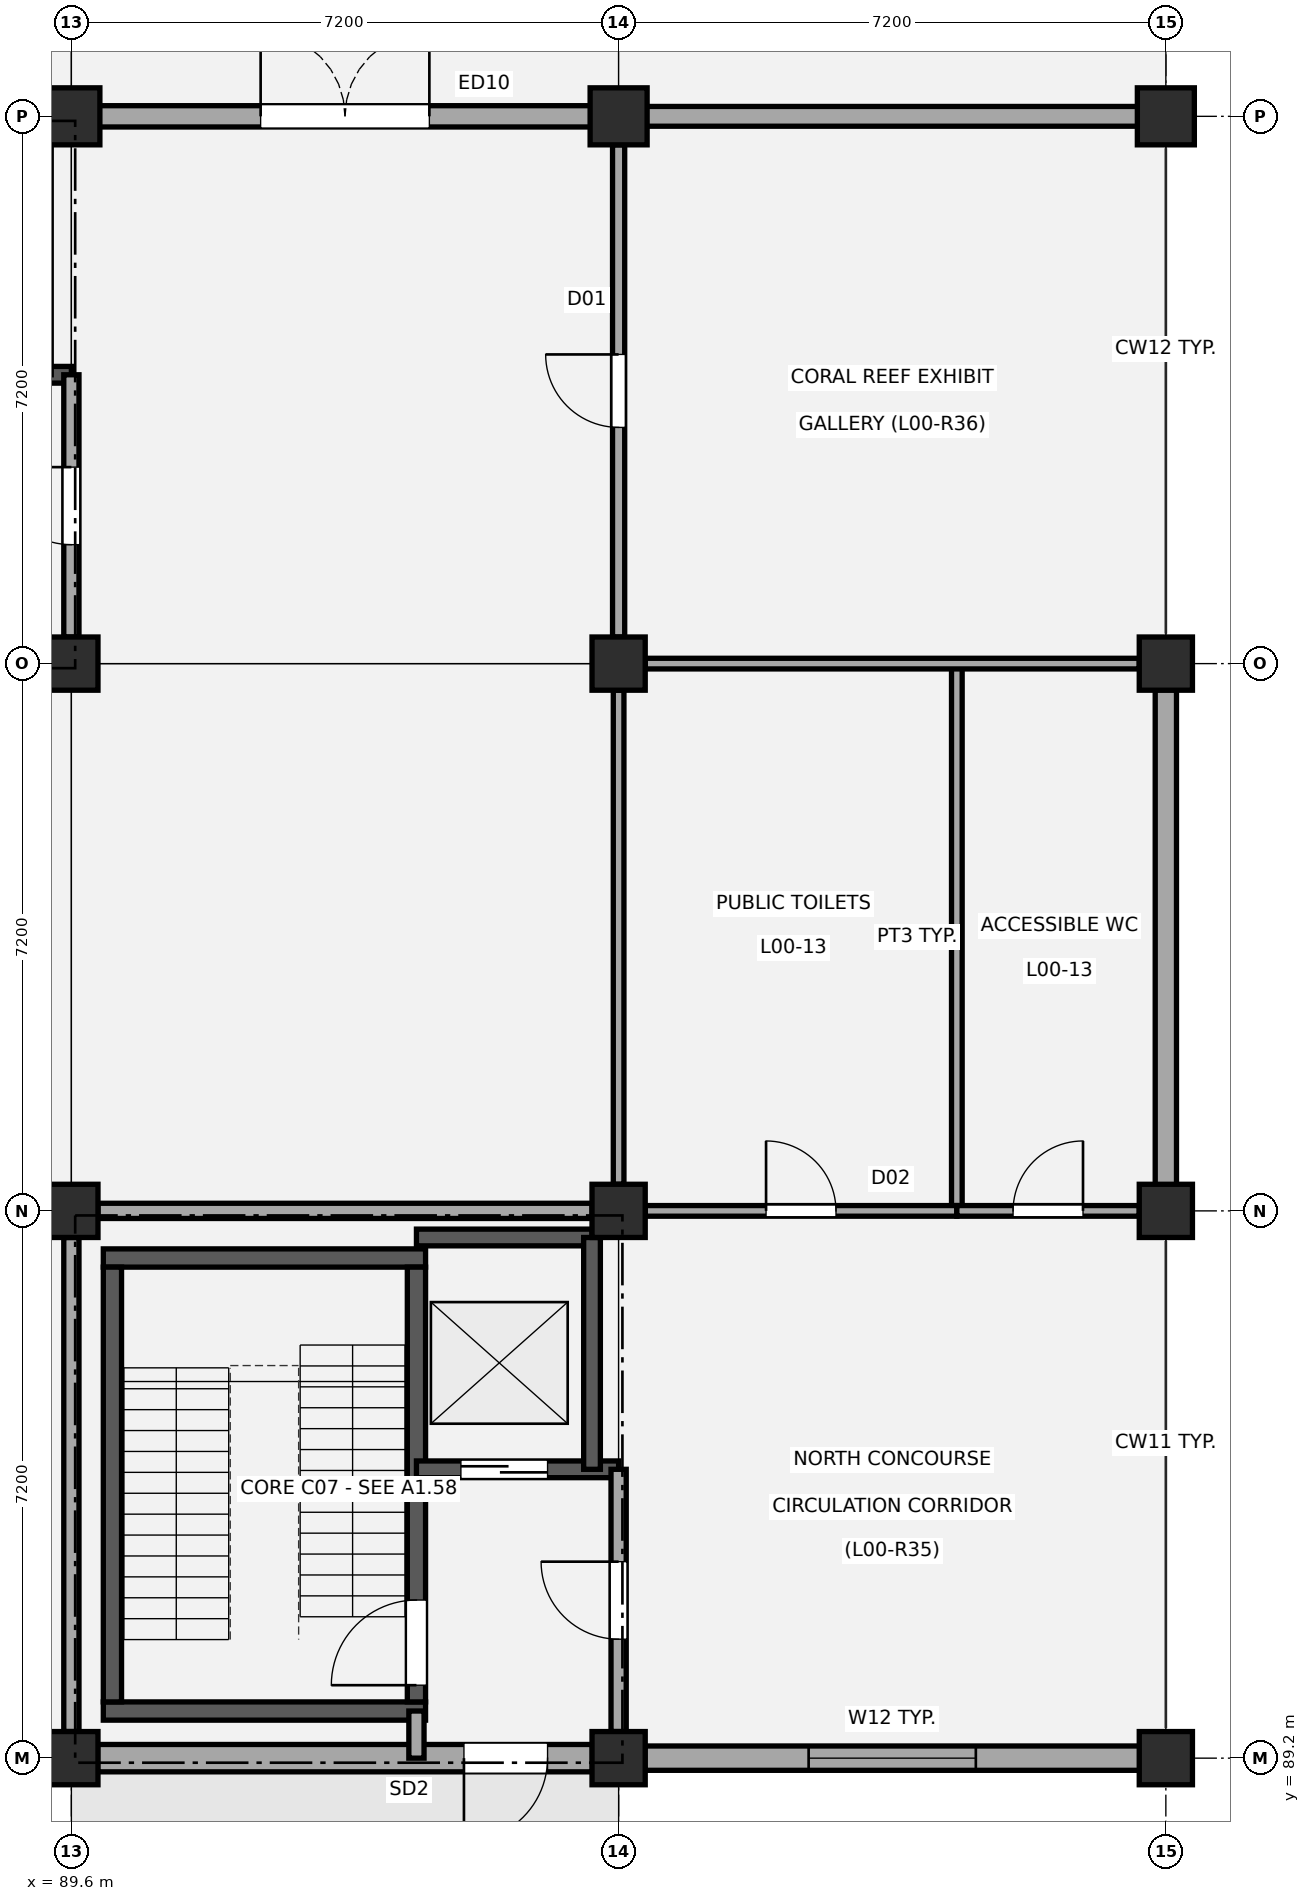
"""IFC4 building model, lengths in metres.
Left out: names, types, materials, properties, quantities, classifications, styles, units other than length and angle.
Written with IfcOpenShell. Run it as: python <this file> out.ifc"""

import sys

from ifc_helpers import new_model, si_unit, direction, frame, frame_2d, origin, origin_2d, place, context, subcontext, project, spatial, rectangle, circle, extrude, element, fill, save


model = new_model("IFC4")
c1 = context("Model", 3, precision=1e-05, world=origin(), true_north=direction((0.0, 1.0)))
c2 = subcontext(c1, "Body", "Model", "MODEL_VIEW")
j1 = project(units=[si_unit("LENGTHUNIT", "METRE"), si_unit("PLANEANGLEUNIT", "RADIAN")], contexts=[c1])
p1 = place(None, origin())
s1 = spatial("IfcSite", under=j1, at=p1, CompositionType="ELEMENT")
p2 = place(p1, origin())
s2 = spatial("IfcBuilding", under=s1, at=p2, CompositionType="ELEMENT")
p3 = place(p2, origin())
s3 = spatial("IfcBuildingStorey", under=s2, at=p3, CompositionType="ELEMENT", Elevation=0.0)
for number, where, z_axis, x_axis in (
    (1, (89.6, 89.2, -0.35), (0.0, 0.0, 1.0), (1.0, 0.0, 0.0)),
    (2, (89.6, 96.4, -0.35), (0.0, 0.0, 1.0), (1.0, 0.0, 0.0)),
    (3, (89.6, 103.6, -0.35), (0.0, 0.0, 1.0), (1.0, 0.0, 0.0)),
):
    element("IfcColumn", number, at=place(p3, frame(where, z_axis=z_axis, x_axis=x_axis)), inside=s3, PredefinedType="COLUMN", context=c2, shape_type="SweptSolid", body=[
        extrude(rectangle(XDim=0.7, YDim=0.7, at=origin_2d()), origin(), (0.0, 0.0, 1.0), 5.03),
    ])
p4 = place(p3, frame((89.6, 110.8, -0.35), z_axis=(0.0, 0.0, 1.0), x_axis=(1.0, 0.0, 0.0)))
e4 = element("IfcColumn", 4, at=p4, inside=s3, PredefinedType="COLUMN", context=c2, shape_type="SweptSolid", body=[
    extrude(circle(Radius=0.375, at=origin_2d()), origin(), (0.0, 0.0, 1.0), 5.03),
])
for number, where, z_axis, x_axis in (
    (5, (96.8, 89.2, -0.35), (0.0, 0.0, 1.0), (1.0, 0.0, 0.0)),
    (6, (96.8, 96.4, -0.35), (0.0, 0.0, 1.0), (1.0, 0.0, 0.0)),
    (7, (96.8, 103.6, -0.35), (0.0, 0.0, 1.0), (1.0, 0.0, 0.0)),
):
    element("IfcColumn", number, at=place(p3, frame(where, z_axis=z_axis, x_axis=x_axis)), inside=s3, PredefinedType="COLUMN", context=c2, shape_type="SweptSolid", body=[
        extrude(rectangle(XDim=0.7, YDim=0.7, at=origin_2d()), origin(), (0.0, 0.0, 1.0), 5.03),
    ])
p5 = place(p3, frame((96.8, 110.8, -0.35), z_axis=(0.0, 0.0, 1.0), x_axis=(1.0, 0.0, 0.0)))
e8 = element("IfcColumn", 8, at=p5, inside=s3, PredefinedType="COLUMN", context=c2, shape_type="SweptSolid", body=[
    extrude(circle(Radius=0.375, at=origin_2d()), origin(), (0.0, 0.0, 1.0), 5.03),
])
for number, where, z_axis, x_axis in (
    (9, (104.0, 89.2, -0.35), (0.0, 0.0, 1.0), (1.0, 0.0, 0.0)),
    (10, (104.0, 96.4, -0.35), (0.0, 0.0, 1.0), (1.0, 0.0, 0.0)),
    (11, (104.0, 103.6, -0.35), (0.0, 0.0, 1.0), (1.0, 0.0, 0.0)),
):
    element("IfcColumn", number, at=place(p3, frame(where, z_axis=z_axis, x_axis=x_axis)), inside=s3, PredefinedType="COLUMN", context=c2, shape_type="SweptSolid", body=[
        extrude(rectangle(XDim=0.7, YDim=0.7, at=origin_2d()), origin(), (0.0, 0.0, 1.0), 5.03),
    ])
p6 = place(p3, frame((104.0, 110.8, -0.35), z_axis=(0.0, 0.0, 1.0), x_axis=(1.0, 0.0, 0.0)))
e12 = element("IfcColumn", 12, at=p6, inside=s3, PredefinedType="COLUMN", context=c2, shape_type="SweptSolid", body=[
    extrude(circle(Radius=0.375, at=origin_2d()), origin(), (0.0, 0.0, 1.0), 5.03),
])
p7 = place(p3, frame((96.455, 89.2, 0.0), z_axis=(0.0, 0.0, 1.0), x_axis=(-1.0, 0.0, 0.0)))
e13 = element("IfcWall", 13, at=p7, inside=s3, PredefinedType="STANDARD", context=c2, shape_type="SweptSolid", body=[
    extrude(rectangle(XDim=6.51, YDim=0.36, at=frame_2d((3.255, 0.0))), origin(), (0.0, 0.0, 1.0), 3.67),
])
p8 = place(p7, frame((0.59, 0.0, 0.0)))
e14 = element("IfcOpeningElement", 14, at=p8, cuts=e13, PredefinedType="OPENING", context=c2, shape_type="SweptSolid", body=[
    extrude(rectangle(XDim=1.1, YDim=2.15, at=frame_2d((0.55, 1.075))), frame((0.0, 0.19, 0.0), z_axis=(0.0, -1.0, 0.0), x_axis=(1.0, 0.0, 0.0)), (0.0, 0.0, 1.0), 0.38),
])
p9 = place(p3, frame((89.91, 110.8, 0.0), z_axis=(0.0, 0.0, 1.0), x_axis=(1.0, 0.0, 0.0)))
e15 = element("IfcWall", 15, at=p9, inside=s3, PredefinedType="STANDARD", context=c2, shape_type="SweptSolid", body=[
    extrude(rectangle(XDim=6.58, YDim=0.28, at=frame_2d((3.29, 0.0))), origin(), (0.0, 0.0, 1.0), 3.67),
])
p10 = place(p9, frame((2.18, 0.0, 0.0)))
e16 = element("IfcOpeningElement", 16, at=p10, cuts=e15, PredefinedType="OPENING", context=c2, shape_type="SweptSolid", body=[
    extrude(rectangle(XDim=2.22, YDim=2.38, at=frame_2d((1.11, 1.19))), frame((0.0, 0.15, 0.0), z_axis=(0.0, -1.0, 0.0), x_axis=(1.0, 0.0, 0.0)), (0.0, 0.0, 1.0), 0.3),
])
p11 = place(p3, frame((103.655, 89.2, 0.0), z_axis=(0.0, 0.0, 1.0), x_axis=(-1.0, 0.0, 0.0)))
e17 = element("IfcWall", 17, at=p11, inside=s3, PredefinedType="STANDARD", context=c2, shape_type="SweptSolid", body=[
    extrude(rectangle(XDim=6.51, YDim=0.32, at=frame_2d((3.255, 0.0))), origin(), (0.0, 0.0, 1.0), 3.67),
])
p12 = place(p11, frame((2.155, 0.0, 0.95)))
e18 = element("IfcOpeningElement", 18, at=p12, cuts=e17, PredefinedType="OPENING", context=c2, shape_type="SweptSolid", body=[
    extrude(rectangle(XDim=2.2, YDim=2.0, at=frame_2d((1.1, 1.0))), frame((0.0, 0.17, 0.0), z_axis=(0.0, -1.0, 0.0), x_axis=(1.0, 0.0, 0.0)), (0.0, 0.0, 1.0), 0.34),
])
p13 = place(p3, frame((97.11, 110.8, 0.0), z_axis=(0.0, 0.0, 1.0), x_axis=(1.0, 0.0, 0.0)))
e19 = element("IfcWall", 19, at=p13, inside=s3, PredefinedType="STANDARD", context=c2, shape_type="SweptSolid", body=[
    extrude(rectangle(XDim=6.58, YDim=0.26, at=frame_2d((3.29, 0.0))), origin(), (0.0, 0.0, 1.0), 3.67),
])
p14 = place(p3, frame((104.0, 103.255, 0.0), z_axis=(0.0, 0.0, 1.0), x_axis=(0.0, -1.0, 0.0)))
e20 = element("IfcWall", 20, at=p14, inside=s3, PredefinedType="STANDARD", context=c2, shape_type="SweptSolid", body=[
    extrude(rectangle(XDim=6.51, YDim=0.28, at=frame_2d((3.255, 0.0))), origin(), (0.0, 0.0, 1.0), 3.67),
])
p15 = place(p3, frame((86.94, 107.4, 0.0), z_axis=(0.0, 0.0, 1.0), x_axis=(1.0, 0.0, 0.0)))
e21 = element("IfcWall", 21, at=p15, inside=s3, PredefinedType="SHEAR", context=c2, shape_type="SweptSolid", body=[
    extrude(rectangle(XDim=2.66, YDim=0.22, at=frame_2d((1.33, 0.0))), origin(), (0.0, 0.0, 1.0), 4.38),
])
p16 = place(p15, frame((0.472, 0.0, 0.0)))
e22 = element("IfcOpeningElement", 22, at=p16, cuts=e21, PredefinedType="OPENING", context=c2, shape_type="SweptSolid", body=[
    extrude(rectangle(XDim=1.34, YDim=2.15, at=frame_2d((0.67, 1.075))), frame((0.0, 0.12, 0.0), z_axis=(0.0, -1.0, 0.0), x_axis=(1.0, 0.0, 0.0)), (0.0, 0.0, 1.0), 0.24),
])
p17 = place(p3, frame((89.6, 103.95, 0.0), z_axis=(0.0, 0.0, 1.0), x_axis=(0.0, 1.0, 0.0)))
e23 = element("IfcWall", 23, at=p17, inside=s3, PredefinedType="PARTITIONING", context=c2, shape_type="SweptSolid", body=[
    extrude(rectangle(XDim=3.45, YDim=0.2, at=frame_2d((1.725, 0.0))), origin(), (0.0, 0.0, 1.0), 3.62),
])
p18 = place(p17, frame((1.215, 0.0, 0.0)))
e24 = element("IfcOpeningElement", 24, at=p18, cuts=e23, PredefinedType="OPENING", context=c2, shape_type="SweptSolid", body=[
    extrude(rectangle(XDim=1.02, YDim=2.15, at=frame_2d((0.51, 1.075))), frame((0.0, 0.11, 0.0), z_axis=(0.0, -1.0, 0.0), x_axis=(1.0, 0.0, 0.0)), (0.0, 0.0, 1.0), 0.22),
])
for number, where, z_axis, x_axis in (
    (25, (90.02, 89.82, 0.0), (0.0, 0.0, 1.0), (1.0, 0.0, 0.0)),
    (26, (90.02, 95.78, 0.0), (0.0, 0.0, 1.0), (1.0, 0.0, 0.0)),
):
    element("IfcWall", number, at=place(p3, frame(where, z_axis=z_axis, x_axis=x_axis)), inside=s3, PredefinedType="SHEAR", context=c2, shape_type="SweptSolid", body=[
        extrude(rectangle(XDim=4.24, YDim=0.24, at=frame_2d((2.12, 0.0))), origin(), (0.0, 0.0, 1.0), 4.38),
    ])
p19 = place(p3, frame((90.14, 89.94, 0.0), z_axis=(0.0, 0.0, 1.0), x_axis=(0.0, 1.0, 0.0)))
e27 = element("IfcWall", 27, at=p19, inside=s3, PredefinedType="SHEAR", context=c2, shape_type="SweptSolid", body=[
    extrude(rectangle(XDim=5.72, YDim=0.24, at=frame_2d((2.86, 0.0))), origin(), (0.0, 0.0, 1.0), 4.38),
])
p20 = place(p3, frame((94.14, 89.94, 0.0), z_axis=(0.0, 0.0, 1.0), x_axis=(0.0, 1.0, 0.0)))
e28 = element("IfcWall", 28, at=p20, inside=s3, PredefinedType="SHEAR", context=c2, shape_type="SweptSolid", body=[
    extrude(rectangle(XDim=5.72, YDim=0.24, at=frame_2d((2.86, 0.0))), origin(), (0.0, 0.0, 1.0), 4.38),
])
p21 = place(p20, frame((0.22, 0.0, 0.0)))
e29 = element("IfcOpeningElement", 29, at=p21, cuts=e28, PredefinedType="OPENING", context=c2, shape_type="SweptSolid", body=[
    extrude(rectangle(XDim=1.12, YDim=2.15, at=frame_2d((0.56, 1.075))), frame((0.0, 0.13, 0.0), z_axis=(0.0, -1.0, 0.0), x_axis=(1.0, 0.0, 0.0)), (0.0, 0.0, 1.0), 0.26),
])
p22 = place(p3, frame((94.14, 93.0, 0.0), z_axis=(0.0, 0.0, 1.0), x_axis=(1.0, 0.0, 0.0)))
e30 = element("IfcWall", 30, at=p22, inside=s3, PredefinedType="SHEAR", context=c2, shape_type="SweptSolid", body=[
    extrude(rectangle(XDim=2.66, YDim=0.22, at=frame_2d((1.33, 0.0))), origin(), (0.0, 0.0, 1.0), 4.38),
])
p23 = place(p22, frame((0.585, 0.0, 0.0)))
e31 = element("IfcOpeningElement", 31, at=p23, cuts=e30, PredefinedType="OPENING", context=c2, shape_type="SweptSolid", body=[
    extrude(rectangle(XDim=1.14, YDim=2.15, at=frame_2d((0.57, 1.075))), frame((0.0, 0.12, 0.0), z_axis=(0.0, -1.0, 0.0), x_axis=(1.0, 0.0, 0.0)), (0.0, 0.0, 1.0), 0.24),
])
p24 = place(p3, frame((94.14, 96.05, 0.0), z_axis=(0.0, 0.0, 1.0), x_axis=(1.0, 0.0, 0.0)))
e32 = element("IfcWall", 32, at=p24, inside=s3, PredefinedType="SHEAR", context=c2, shape_type="SweptSolid", body=[
    extrude(rectangle(XDim=2.31, YDim=0.22, at=frame_2d((1.155, 0.0))), origin(), (0.0, 0.0, 1.0), 4.38),
])
p25 = place(p3, frame((96.45, 93.0, 0.0), z_axis=(0.0, 0.0, 1.0), x_axis=(0.0, 1.0, 0.0)))
e33 = element("IfcWall", 33, at=p25, inside=s3, PredefinedType="SHEAR", context=c2, shape_type="SweptSolid", body=[
    extrude(rectangle(XDim=3.05, YDim=0.22, at=frame_2d((1.525, 0.0))), origin(), (0.0, 0.0, 1.0), 4.38),
])
p26 = place(p3, frame((94.14, 89.2, 0.0), z_axis=(0.0, 0.0, 1.0), x_axis=(0.0, 1.0, 0.0)))
e34 = element("IfcWall", 34, at=p26, inside=s3, PredefinedType="PARTITIONING", context=c2, shape_type="SweptSolid", body=[
    extrude(rectangle(XDim=0.62, YDim=0.2, at=frame_2d((0.31, 0.0))), origin(), (0.0, 0.0, 1.0), 3.67),
])
p27 = place(p3, frame((89.6, 89.55, 0.0), z_axis=(0.0, 0.0, 1.0), x_axis=(0.0, 1.0, 0.0)))
e35 = element("IfcWall", 35, at=p27, inside=s3, PredefinedType="PARTITIONING", context=c2, shape_type="SweptSolid", body=[
    extrude(rectangle(XDim=6.5, YDim=0.2, at=frame_2d((3.25, 0.0))), origin(), (0.0, 0.0, 1.0), 3.62),
])
p28 = place(p3, frame((96.8, 89.55, 0.0), z_axis=(0.0, 0.0, 1.0), x_axis=(0.0, 1.0, 0.0)))
e36 = element("IfcWall", 36, at=p28, inside=s3, PredefinedType="PARTITIONING", context=c2, shape_type="SweptSolid", body=[
    extrude(rectangle(XDim=3.45, YDim=0.2, at=frame_2d((1.725, 0.0))), origin(), (0.0, 0.0, 1.0), 3.62),
])
p29 = place(p28, frame((1.215, 0.0, 0.0)))
e37 = element("IfcOpeningElement", 37, at=p29, cuts=e36, PredefinedType="OPENING", context=c2, shape_type="SweptSolid", body=[
    extrude(rectangle(XDim=1.02, YDim=2.15, at=frame_2d((0.51, 1.075))), frame((0.0, 0.11, 0.0), z_axis=(0.0, -1.0, 0.0), x_axis=(1.0, 0.0, 0.0)), (0.0, 0.0, 1.0), 0.22),
])
p30 = place(p3, frame((89.95, 96.4, 0.0), z_axis=(0.0, 0.0, 1.0), x_axis=(1.0, 0.0, 0.0)))
e38 = element("IfcWall", 38, at=p30, inside=s3, PredefinedType="PARTITIONING", context=c2, shape_type="SweptSolid", body=[
    extrude(rectangle(XDim=6.5, YDim=0.2, at=frame_2d((3.25, 0.0))), origin(), (0.0, 0.0, 1.0), 3.62),
])
p31 = place(p3, frame((101.25, 96.4, 0.0), z_axis=(0.0, 0.0, 1.0), x_axis=(0.0, 1.0, 0.0)))
e39 = element("IfcWall", 39, at=p31, inside=s3, PredefinedType="PARTITIONING", context=c2, shape_type="SweptSolid", body=[
    extrude(rectangle(XDim=7.2, YDim=0.14, at=frame_2d((3.6, 0.0))), origin(), (0.0, 0.0, 1.0), 3.8),
])
p32 = place(p3, frame((97.15, 96.4, 0.0), z_axis=(0.0, 0.0, 1.0), x_axis=(1.0, 0.0, 0.0)))
e40 = element("IfcWall", 40, at=p32, inside=s3, PredefinedType="PARTITIONING", context=c2, shape_type="SweptSolid", body=[
    extrude(rectangle(XDim=4.1, YDim=0.14, at=frame_2d((2.05, 0.0))), origin(), (0.0, 0.0, 1.0), 3.52),
])
p33 = place(p32, frame((1.59, 0.0, 0.0)))
e41 = element("IfcOpeningElement", 41, at=p33, cuts=e40, PredefinedType="OPENING", context=c2, shape_type="SweptSolid", body=[
    extrude(rectangle(XDim=0.92, YDim=2.08, at=frame_2d((0.46, 1.04))), frame((0.0, 0.08, 0.0), z_axis=(0.0, -1.0, 0.0), x_axis=(1.0, 0.0, 0.0)), (0.0, 0.0, 1.0), 0.16),
])
p34 = place(p3, frame((101.25, 96.4, 0.0), z_axis=(0.0, 0.0, 1.0), x_axis=(1.0, 0.0, 0.0)))
e42 = element("IfcWall", 42, at=p34, inside=s3, PredefinedType="PARTITIONING", context=c2, shape_type="SweptSolid", body=[
    extrude(rectangle(XDim=2.4, YDim=0.14, at=frame_2d((1.2, 0.0))), origin(), (0.0, 0.0, 1.0), 3.52),
])
p35 = place(p34, frame((0.74, 0.0, 0.0)))
e43 = element("IfcOpeningElement", 43, at=p35, cuts=e42, PredefinedType="OPENING", context=c2, shape_type="SweptSolid", body=[
    extrude(rectangle(XDim=0.92, YDim=2.08, at=frame_2d((0.46, 1.04))), frame((0.0, 0.08, 0.0), z_axis=(0.0, -1.0, 0.0), x_axis=(1.0, 0.0, 0.0)), (0.0, 0.0, 1.0), 0.16),
])
for number, where, z_axis, x_axis in (
    (44, (97.15, 103.6, 0.0), (0.0, 0.0, 1.0), (1.0, 0.0, 0.0)),
    (45, (96.8, 96.75, 0.0), (0.0, 0.0, 1.0), (0.0, 1.0, 0.0)),
):
    element("IfcWall", number, at=place(p3, frame(where, z_axis=z_axis, x_axis=x_axis)), inside=s3, PredefinedType="PARTITIONING", context=c2, shape_type="SweptSolid", body=[
        extrude(rectangle(XDim=6.5, YDim=0.14, at=frame_2d((3.25, 0.0))), origin(), (0.0, 0.0, 1.0), 3.62),
    ])
p36 = place(p3, frame((96.8, 103.95, 0.0), z_axis=(0.0, 0.0, 1.0), x_axis=(0.0, 1.0, 0.0)))
e46 = element("IfcWall", 46, at=p36, inside=s3, PredefinedType="PARTITIONING", context=c2, shape_type="SweptSolid", body=[
    extrude(rectangle(XDim=6.475, YDim=0.16, at=frame_2d((3.238, 0.0))), origin(), (0.0, 0.0, 1.0), 3.62),
])
p37 = place(p36, frame((2.758, 0.0, 0.0)))
e47 = element("IfcOpeningElement", 47, at=p37, cuts=e46, PredefinedType="OPENING", context=c2, shape_type="SweptSolid", body=[
    extrude(rectangle(XDim=0.96, YDim=2.1, at=frame_2d((0.48, 1.05))), frame((0.0, 0.09, 0.0), z_axis=(0.0, -1.0, 0.0), x_axis=(1.0, 0.0, 0.0)), (0.0, 0.0, 1.0), 0.18),
])
p38 = place(p8, origin())
e48 = element("IfcDoor", 48, at=p38, inside=s3, OperationType="SINGLE_SWING_RIGHT", PredefinedType="DOOR", context=c2, shape_type="SweptSolid", body=[
    extrude(rectangle(XDim=1.1, YDim=2.15, at=frame_2d((0.55, 1.075))), frame((0.0, 0.025, 0.0), z_axis=(0.0, -1.0, 0.0), x_axis=(1.0, 0.0, 0.0)), (0.0, 0.0, 1.0), 0.05),
])
fill(e14, e48)
p39 = place(p10, origin())
e49 = element("IfcDoor", 49, at=p39, inside=s3, OperationType="DOUBLE_DOOR_SINGLE_SWING", PredefinedType="DOOR", context=c2, shape_type="SweptSolid", body=[
    extrude(rectangle(XDim=2.22, YDim=2.38, at=frame_2d((1.11, 1.19))), frame((0.0, 0.025, 0.0), z_axis=(0.0, -1.0, 0.0), x_axis=(1.0, 0.0, 0.0)), (0.0, 0.0, 1.0), 0.05),
])
fill(e16, e49)
p40 = place(p12, origin())
e50 = element("IfcWindow", 50, at=p40, inside=s3, PartitioningType="SINGLE_PANEL", PredefinedType="WINDOW", context=c2, shape_type="SweptSolid", body=[
    extrude(rectangle(XDim=2.2, YDim=2.0, at=frame_2d((1.1, 1.0))), frame((0.0, 0.03, 0.0), z_axis=(0.0, -1.0, 0.0), x_axis=(1.0, 0.0, 0.0)), (0.0, 0.0, 1.0), 0.06),
])
fill(e18, e50)
p41 = place(p18, origin())
e51 = element("IfcDoor", 51, at=p41, inside=s3, OperationType="SINGLE_SWING_RIGHT", PredefinedType="DOOR", context=c2, shape_type="SweptSolid", body=[
    extrude(rectangle(XDim=1.02, YDim=2.15, at=frame_2d((0.51, 1.075))), frame((0.0, 0.025, 0.0), z_axis=(0.0, -1.0, 0.0), x_axis=(1.0, 0.0, 0.0)), (0.0, 0.0, 1.0), 0.05),
])
fill(e24, e51)
p42 = place(p21, origin())
e52 = element("IfcDoor", 52, at=p42, inside=s3, OperationType="SINGLE_SWING_LEFT", PredefinedType="DOOR", context=c2, shape_type="SweptSolid", body=[
    extrude(rectangle(XDim=1.12, YDim=2.15, at=frame_2d((0.56, 1.075))), frame((0.0, 0.025, 0.0), z_axis=(0.0, -1.0, 0.0), x_axis=(1.0, 0.0, 0.0)), (0.0, 0.0, 1.0), 0.05),
])
fill(e29, e52)
p43 = place(p23, origin())
e53 = element("IfcDoor", 53, at=p43, inside=s3, OperationType="SLIDING_TO_LEFT", PredefinedType="DOOR", context=c2, shape_type="SweptSolid", body=[
    extrude(rectangle(XDim=1.14, YDim=2.15, at=frame_2d((0.57, 1.075))), frame((0.0, 0.025, 0.0), z_axis=(0.0, -1.0, 0.0), x_axis=(1.0, 0.0, 0.0)), (0.0, 0.0, 1.0), 0.05),
])
fill(e31, e53)
p44 = place(p29, origin())
e54 = element("IfcDoor", 54, at=p44, inside=s3, OperationType="SINGLE_SWING_RIGHT", PredefinedType="DOOR", context=c2, shape_type="SweptSolid", body=[
    extrude(rectangle(XDim=1.02, YDim=2.15, at=frame_2d((0.51, 1.075))), frame((0.0, 0.025, 0.0), z_axis=(0.0, -1.0, 0.0), x_axis=(1.0, 0.0, 0.0)), (0.0, 0.0, 1.0), 0.05),
])
fill(e37, e54)
p45 = place(p33, origin())
e55 = element("IfcDoor", 55, at=p45, inside=s3, OperationType="SINGLE_SWING_LEFT", PredefinedType="DOOR", context=c2, shape_type="SweptSolid", body=[
    extrude(rectangle(XDim=0.92, YDim=2.08, at=frame_2d((0.46, 1.04))), frame((0.0, 0.025, 0.0), z_axis=(0.0, -1.0, 0.0), x_axis=(1.0, 0.0, 0.0)), (0.0, 0.0, 1.0), 0.05),
])
fill(e41, e55)
p46 = place(p35, origin())
e56 = element("IfcDoor", 56, at=p46, inside=s3, OperationType="SINGLE_SWING_RIGHT", PredefinedType="DOOR", context=c2, shape_type="SweptSolid", body=[
    extrude(rectangle(XDim=0.92, YDim=2.08, at=frame_2d((0.46, 1.04))), frame((0.0, 0.025, 0.0), z_axis=(0.0, -1.0, 0.0), x_axis=(1.0, 0.0, 0.0)), (0.0, 0.0, 1.0), 0.05),
])
fill(e43, e56)
p47 = place(p37, origin())
e57 = element("IfcDoor", 57, at=p47, inside=s3, OperationType="SINGLE_SWING_RIGHT", PredefinedType="DOOR", context=c2, shape_type="SweptSolid", body=[
    extrude(rectangle(XDim=0.96, YDim=2.1, at=frame_2d((0.48, 1.05))), frame((0.0, 0.025, 0.0), z_axis=(0.0, -1.0, 0.0), x_axis=(1.0, 0.0, 0.0)), (0.0, 0.0, 1.0), 0.05),
])
fill(e47, e57)
save(model, sys.argv[1])
